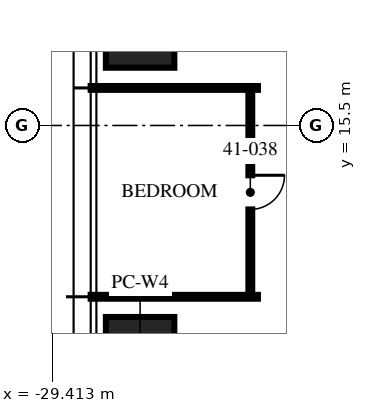
"""IFC4 building model, lengths in metres.
Left out: names, types, materials, properties, quantities, classifications, styles, units other than length and angle.
Written with IfcOpenShell. Run it as: python <this file> out.ifc"""

import sys

from ifc_helpers import new_model, si_unit, direction, frame, frame_2d, origin, origin_2d, place, context, subcontext, project, spatial, rectangle, extrude, element, fill, save


model = new_model("IFC4")
c1 = context("Model", 3, precision=1e-05, world=origin(), true_north=direction((0.0, 1.0)))
c2 = subcontext(c1, "Body", "Model", "MODEL_VIEW")
j1 = project(units=[si_unit("LENGTHUNIT", "METRE"), si_unit("PLANEANGLEUNIT", "RADIAN")], contexts=[c1])
p1 = place(None, origin())
s1 = spatial("IfcSite", under=j1, at=p1, CompositionType="ELEMENT")
p2 = place(p1, origin())
s2 = spatial("IfcBuilding", under=s1, at=p2, CompositionType="ELEMENT")
p3 = place(p2, frame((0.0, 0.0, 163.5)))
s3 = spatial("IfcBuildingStorey", under=s2, at=p3, CompositionType="ELEMENT", Elevation=163.5)
for number, where, z_axis, x_axis in (
    (1, (-27.1, 9.16, 0.0), (0.0, 0.0, 1.0), (0.0, 1.0, 0.0)),
    (2, (-27.1, 18.32, 0.0), (0.0, 0.0, 1.0), (0.0, 1.0, 0.0)),
):
    element("IfcColumn", number, at=place(p3, frame(where, z_axis=z_axis, x_axis=x_axis)), inside=s3, PredefinedType="COLUMN", context=c2, shape_type="SweptSolid", body=[
        extrude(rectangle(XDim=2.6, YDim=1.8, at=origin_2d()), origin(), (0.0, 0.0, 1.0), 3.75),
    ])
for number, where, z_axis, x_axis in (
    (3, (-24.0, 16.488, 0.0), (0.0, 0.0, 1.0), (-1.0, 0.0, 0.0)),
    (4, (-24.0, 10.992, 0.0), (0.0, 0.0, 1.0), (-1.0, 0.0, 0.0)),
):
    element("IfcWall", number, at=place(p3, frame(where, z_axis=z_axis, x_axis=x_axis)), inside=s3, PredefinedType="PARTITIONING", context=c2, shape_type="SweptSolid", body=[
        extrude(rectangle(XDim=4.4, YDim=0.1, at=frame_2d((2.2, 0.0))), origin(), (0.0, 0.0, 1.0), 2.81),
    ])
p4 = place(p3, frame((-24.2, 16.488, 0.0), z_axis=(0.0, 0.0, 1.0), x_axis=(0.0, -1.0, 0.0)))
e5 = element("IfcWall", 5, at=p4, inside=s3, PredefinedType="PARTITIONING", context=c2, shape_type="SweptSolid", body=[
    extrude(rectangle(XDim=5.496, YDim=0.1, at=frame_2d((2.748, 0.0))), origin(), (0.0, 0.0, 1.0), 2.81),
])
p5 = place(p4, frame((2.298, 0.0, 0.0)))
e6 = element("IfcOpeningElement", 6, at=p5, cuts=e5, PredefinedType="OPENING", context=c2, shape_type="SweptSolid", body=[
    extrude(rectangle(XDim=0.9, YDim=2.1, at=frame_2d((0.45, 1.05))), frame((0.0, 0.06, 0.0), z_axis=(0.0, -1.0, 0.0), x_axis=(1.0, 0.0, 0.0)), (0.0, 0.0, 1.0), 0.12),
])
p6 = place(p5, origin())
e7 = element("IfcDoor", 7, at=p6, inside=s3, OperationType="SINGLE_SWING_LEFT", PredefinedType="DOOR", context=c2, shape_type="SweptSolid", body=[
    extrude(rectangle(XDim=0.9, YDim=2.1, at=frame_2d((0.45, 1.05))), frame((0.0, 0.025, 0.0), z_axis=(0.0, -1.0, 0.0), x_axis=(1.0, 0.0, 0.0)), (0.0, 0.0, 1.0), 0.05),
])
fill(e6, e7)
save(model, sys.argv[1])
